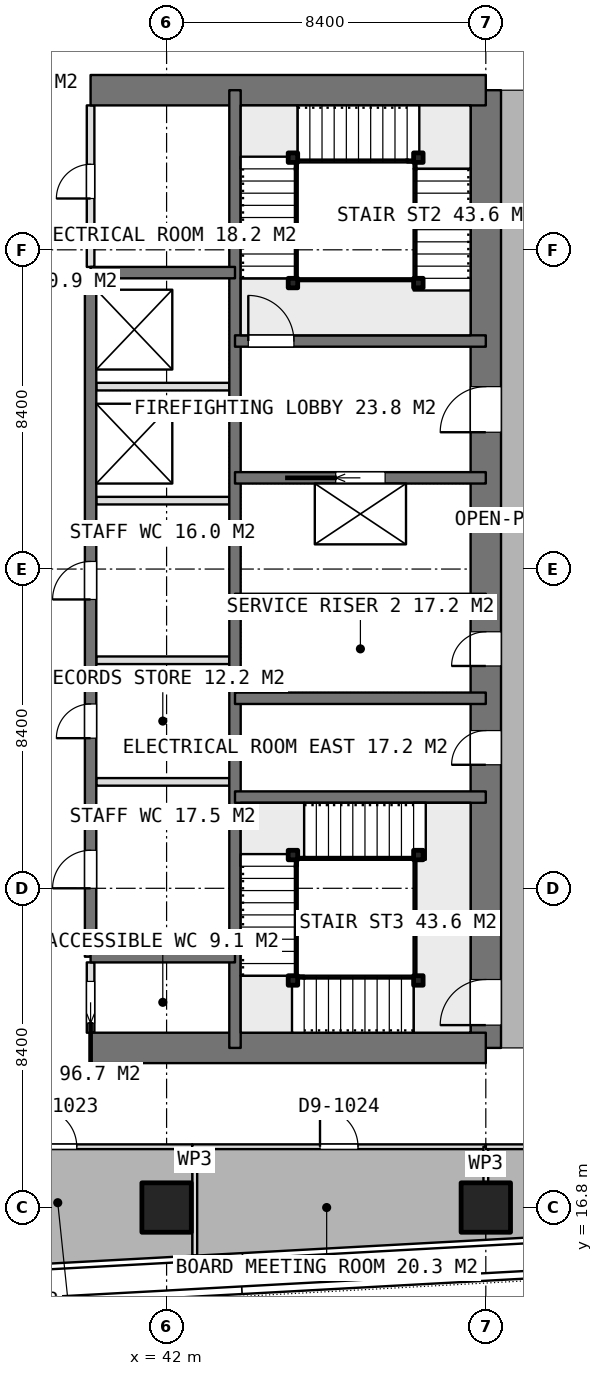
"""IFC4 building model, lengths in metres.
Left out: names, types, materials, properties, quantities, classifications, styles, units other than length and angle.
Written with IfcOpenShell. Run it as: python <this file> out.ifc"""

import sys

from ifc_helpers import new_model, si_unit, direction, frame, frame_2d, origin, origin_2d, place, context, subcontext, project, spatial, rectangle, extrude, element, fill, save


model = new_model("IFC4")
c1 = context("Model", 3, precision=1e-05, world=origin(), true_north=direction((0.0, 1.0)))
c2 = subcontext(c1, "Body", "Model", "MODEL_VIEW")
j1 = project(units=[si_unit("LENGTHUNIT", "METRE"), si_unit("PLANEANGLEUNIT", "RADIAN")], contexts=[c1])
p1 = place(None, origin())
s1 = spatial("IfcSite", under=j1, at=p1, CompositionType="ELEMENT")
p2 = place(p1, origin())
s2 = spatial("IfcBuilding", under=s1, at=p2, CompositionType="ELEMENT")
p3 = place(p2, frame((0.0, 0.0, 276.35)))
s3 = spatial("IfcBuildingStorey", under=s2, at=p3, CompositionType="ELEMENT", Elevation=276.35)
for number, where, z_axis, x_axis in (
    (1, (40.0, 21.0, 0.0), (0.0, 0.0, 1.0), (1.0, 0.0, 0.0)),
    (2, (40.0, 46.2, 0.0), (0.0, 0.0, 1.0), (1.0, 0.0, 0.0)),
):
    element("IfcWall", number, at=place(p3, frame(where, z_axis=z_axis, x_axis=x_axis)), inside=s3, PredefinedType="SHEAR", context=c2, shape_type="SweptSolid", body=[
        extrude(rectangle(XDim=10.4, YDim=0.8, at=frame_2d((5.2, 0.0))), origin(), (0.0, 0.0, 1.0), 3.75),
    ])
p4 = place(p3, frame((50.4, 21.0, 0.0), z_axis=(0.0, 0.0, 1.0), x_axis=(0.0, 1.0, 0.0)))
e3 = element("IfcWall", 3, at=p4, inside=s3, PredefinedType="SHEAR", context=c2, shape_type="SweptSolid", body=[
    extrude(rectangle(XDim=25.2, YDim=0.8, at=frame_2d((12.6, 0.0))), origin(), (0.0, 0.0, 1.0), 3.75),
])
p5 = place(p4, frame((16.2, 0.0, 0.0)))
e4 = element("IfcOpeningElement", 4, at=p5, cuts=e3, PredefinedType="OPENING", context=c2, shape_type="SweptSolid", body=[
    extrude(rectangle(XDim=1.2, YDim=2.1, at=frame_2d((0.6, 1.05))), frame((0.0, 0.41, 0.0), z_axis=(0.0, -1.0, 0.0), x_axis=(1.0, 0.0, 0.0)), (0.0, 0.0, 1.0), 0.82),
])
p6 = place(p4, frame((10.05, 0.0, 0.0)))
e5 = element("IfcOpeningElement", 5, at=p6, cuts=e3, PredefinedType="OPENING", context=c2, shape_type="SweptSolid", body=[
    extrude(rectangle(XDim=0.9, YDim=2.1, at=frame_2d((0.45, 1.05))), frame((0.0, 0.41, 0.0), z_axis=(0.0, -1.0, 0.0), x_axis=(1.0, 0.0, 0.0)), (0.0, 0.0, 1.0), 0.82),
])
p7 = place(p4, frame((7.45, 0.0, 0.0)))
e6 = element("IfcOpeningElement", 6, at=p7, cuts=e3, PredefinedType="OPENING", context=c2, shape_type="SweptSolid", body=[
    extrude(rectangle(XDim=0.9, YDim=2.1, at=frame_2d((0.45, 1.05))), frame((0.0, 0.41, 0.0), z_axis=(0.0, -1.0, 0.0), x_axis=(1.0, 0.0, 0.0)), (0.0, 0.0, 1.0), 0.82),
])
p8 = place(p4, frame((0.6, 0.0, 0.0)))
e7 = element("IfcOpeningElement", 7, at=p8, cuts=e3, PredefinedType="OPENING", context=c2, shape_type="SweptSolid", body=[
    extrude(rectangle(XDim=1.2, YDim=2.1, at=frame_2d((0.6, 1.05))), frame((0.0, 0.41, 0.0), z_axis=(0.0, -1.0, 0.0), x_axis=(1.0, 0.0, 0.0)), (0.0, 0.0, 1.0), 0.82),
])
p9 = place(p3, frame((43.8, 21.0, 0.0), z_axis=(0.0, 0.0, 1.0), x_axis=(0.0, 1.0, 0.0)))
e8 = element("IfcWall", 8, at=p9, inside=s3, PredefinedType="SHEAR", context=c2, shape_type="SweptSolid", body=[
    extrude(rectangle(XDim=25.2, YDim=0.3, at=frame_2d((12.6, 0.0))), origin(), (0.0, 0.0, 1.0), 3.75),
])
p10 = place(p3, frame((40.0, 23.4, 0.0), z_axis=(0.0, 0.0, 1.0), x_axis=(0.0, 1.0, 0.0)))
e9 = element("IfcWall", 9, at=p10, inside=s3, PredefinedType="SHEAR", context=c2, shape_type="SweptSolid", body=[
    extrude(rectangle(XDim=18.0, YDim=0.3, at=frame_2d((9.0, 0.0))), origin(), (0.0, 0.0, 1.0), 3.75),
])
p11 = place(p10, frame((1.8, 0.0, 0.0)))
e10 = element("IfcOpeningElement", 10, at=p11, cuts=e9, PredefinedType="OPENING", context=c2, shape_type="SweptSolid", body=[
    extrude(rectangle(XDim=1.0, YDim=2.1, at=frame_2d((0.5, 1.05))), frame((0.0, 0.16, 0.0), z_axis=(0.0, -1.0, 0.0), x_axis=(1.0, 0.0, 0.0)), (0.0, 0.0, 1.0), 0.32),
])
p12 = place(p10, frame((5.75, 0.0, 0.0)))
e11 = element("IfcOpeningElement", 11, at=p12, cuts=e9, PredefinedType="OPENING", context=c2, shape_type="SweptSolid", body=[
    extrude(rectangle(XDim=0.9, YDim=2.1, at=frame_2d((0.45, 1.05))), frame((0.0, 0.16, 0.0), z_axis=(0.0, -1.0, 0.0), x_axis=(1.0, 0.0, 0.0)), (0.0, 0.0, 1.0), 0.32),
])
p13 = place(p10, frame((9.4, 0.0, 0.0)))
e12 = element("IfcOpeningElement", 12, at=p13, cuts=e9, PredefinedType="OPENING", context=c2, shape_type="SweptSolid", body=[
    extrude(rectangle(XDim=1.0, YDim=2.1, at=frame_2d((0.5, 1.05))), frame((0.0, 0.16, 0.0), z_axis=(0.0, -1.0, 0.0), x_axis=(1.0, 0.0, 0.0)), (0.0, 0.0, 1.0), 0.32),
])
for number, where, z_axis, x_axis in (
    (13, (40.0, 23.4, 0.0), (0.0, 0.0, 1.0), (1.0, 0.0, 0.0)),
    (14, (40.0, 41.4, 0.0), (0.0, 0.0, 1.0), (1.0, 0.0, 0.0)),
):
    element("IfcWall", number, at=place(p3, frame(where, z_axis=z_axis, x_axis=x_axis)), inside=s3, PredefinedType="SHEAR", context=c2, shape_type="SweptSolid", body=[
        extrude(rectangle(XDim=3.8, YDim=0.3, at=frame_2d((1.9, 0.0))), origin(), (0.0, 0.0, 1.0), 3.75),
    ])
for number, where, z_axis, x_axis in (
    (15, (43.8, 27.6, 0.0), (0.0, 0.0, 1.0), (1.0, 0.0, 0.0)),
    (16, (43.8, 30.2, 0.0), (0.0, 0.0, 1.0), (1.0, 0.0, 0.0)),
    (17, (43.8, 32.8, 0.0), (0.0, 0.0, 1.0), (1.0, 0.0, 0.0)),
):
    element("IfcWall", number, at=place(p3, frame(where, z_axis=z_axis, x_axis=x_axis)), inside=s3, PredefinedType="SHEAR", context=c2, shape_type="SweptSolid", body=[
        extrude(rectangle(XDim=6.6, YDim=0.3, at=frame_2d((3.3, 0.0))), origin(), (0.0, 0.0, 1.0), 3.75),
    ])
p14 = place(p3, frame((43.8, 36.0, 0.0), z_axis=(0.0, 0.0, 1.0), x_axis=(1.0, 0.0, 0.0)))
e18 = element("IfcWall", 18, at=p14, inside=s3, PredefinedType="SHEAR", context=c2, shape_type="SweptSolid", body=[
    extrude(rectangle(XDim=6.6, YDim=0.3, at=frame_2d((3.3, 0.0))), origin(), (0.0, 0.0, 1.0), 3.75),
])
p15 = place(p14, frame((2.65, 0.0, 0.0)))
e19 = element("IfcOpeningElement", 19, at=p15, cuts=e18, PredefinedType="OPENING", context=c2, shape_type="SweptSolid", body=[
    extrude(rectangle(XDim=1.3, YDim=2.1, at=frame_2d((0.65, 1.05))), frame((0.0, 0.16, 0.0), z_axis=(0.0, -1.0, 0.0), x_axis=(1.0, 0.0, 0.0)), (0.0, 0.0, 1.0), 0.32),
])
p16 = place(p3, frame((43.8, 39.6, 0.0), z_axis=(0.0, 0.0, 1.0), x_axis=(1.0, 0.0, 0.0)))
e20 = element("IfcWall", 20, at=p16, inside=s3, PredefinedType="SHEAR", context=c2, shape_type="SweptSolid", body=[
    extrude(rectangle(XDim=6.6, YDim=0.3, at=frame_2d((3.3, 0.0))), origin(), (0.0, 0.0, 1.0), 3.75),
])
p17 = place(p16, frame((0.35, 0.0, 0.0)))
e21 = element("IfcOpeningElement", 21, at=p17, cuts=e20, PredefinedType="OPENING", context=c2, shape_type="SweptSolid", body=[
    extrude(rectangle(XDim=1.2, YDim=2.1, at=frame_2d((0.6, 1.05))), frame((0.0, 0.16, 0.0), z_axis=(0.0, -1.0, 0.0), x_axis=(1.0, 0.0, 0.0)), (0.0, 0.0, 1.0), 0.32),
])
for number, where, z_axis, x_axis in (
    (22, (42.0, 16.8, 0.0), (0.0, 0.0, 1.0), (1.0, 0.0, 0.0)),
    (23, (50.4, 16.8, 0.0), (0.0, 0.0, 1.0), (1.0, 0.0, 0.0)),
):
    element("IfcColumn", number, at=place(p3, frame(where, z_axis=z_axis, x_axis=x_axis)), inside=s3, PredefinedType="COLUMN", context=c2, shape_type="SweptSolid", body=[
        extrude(rectangle(XDim=1.3, YDim=1.3, at=origin_2d()), origin(), (0.0, 0.0, 1.0), 3.75),
    ])
for number, where, z_axis, x_axis in (
    (24, (40.15, 35.4, 0.0), (0.0, 0.0, 1.0), (1.0, 0.0, 0.0)),
    (25, (40.15, 38.4, 0.0), (0.0, 0.0, 1.0), (1.0, 0.0, 0.0)),
):
    element("IfcWall", number, at=place(p3, frame(where, z_axis=z_axis, x_axis=x_axis)), inside=s3, PredefinedType="PARTITIONING", context=c2, shape_type="SweptSolid", body=[
        extrude(rectangle(XDim=3.5, YDim=0.2, at=frame_2d((1.75, 0.0))), origin(), (0.0, 0.0, 1.0), 3.5),
    ])
p18 = place(p3, frame((40.0, 21.4, 0.0), z_axis=(0.0, 0.0, 1.0), x_axis=(0.0, 1.0, 0.0)))
e26 = element("IfcWall", 26, at=p18, inside=s3, PredefinedType="PARTITIONING", context=c2, shape_type="SweptSolid", body=[
    extrude(rectangle(XDim=1.85, YDim=0.2, at=frame_2d((0.925, 0.0))), origin(), (0.0, 0.0, 1.0), 3.5),
])
p19 = place(p18, frame((0.25, 0.0, 0.0)))
e27 = element("IfcOpeningElement", 27, at=p19, cuts=e26, PredefinedType="OPENING", context=c2, shape_type="SweptSolid", body=[
    extrude(rectangle(XDim=1.1, YDim=2.1, at=frame_2d((0.55, 1.05))), frame((0.0, 0.11, 0.0), z_axis=(0.0, -1.0, 0.0), x_axis=(1.0, 0.0, 0.0)), (0.0, 0.0, 1.0), 0.22),
])
p20 = place(p3, frame((40.0, 41.55, 0.0), z_axis=(0.0, 0.0, 1.0), x_axis=(0.0, 1.0, 0.0)))
e28 = element("IfcWall", 28, at=p20, inside=s3, PredefinedType="PARTITIONING", context=c2, shape_type="SweptSolid", body=[
    extrude(rectangle(XDim=4.25, YDim=0.2, at=frame_2d((2.125, 0.0))), origin(), (0.0, 0.0, 1.0), 3.5),
])
p21 = place(p20, frame((1.8, 0.0, 0.0)))
e29 = element("IfcOpeningElement", 29, at=p21, cuts=e28, PredefinedType="OPENING", context=c2, shape_type="SweptSolid", body=[
    extrude(rectangle(XDim=0.9, YDim=2.1, at=frame_2d((0.45, 1.05))), frame((0.0, 0.11, 0.0), z_axis=(0.0, -1.0, 0.0), x_axis=(1.0, 0.0, 0.0)), (0.0, 0.0, 1.0), 0.22),
])
for number, where, z_axis, x_axis in (
    (30, (40.15, 28.0, 0.0), (0.0, 0.0, 1.0), (1.0, 0.0, 0.0)),
    (31, (40.15, 31.2, 0.0), (0.0, 0.0, 1.0), (1.0, 0.0, 0.0)),
):
    element("IfcWall", number, at=place(p3, frame(where, z_axis=z_axis, x_axis=x_axis)), inside=s3, PredefinedType="PARTITIONING", context=c2, shape_type="SweptSolid", body=[
        extrude(rectangle(XDim=3.5, YDim=0.2, at=frame_2d((1.75, 0.0))), origin(), (0.0, 0.0, 1.0), 3.5),
    ])
p22 = place(p3, frame((35.599, 18.4, 0.0), z_axis=(0.0, 0.0, 1.0), x_axis=(1.0, 0.0, 0.0)))
e32 = element("IfcWall", 32, at=p22, inside=s3, PredefinedType="PARTITIONING", context=c2, shape_type="SweptSolid", body=[
    extrude(rectangle(XDim=7.074, YDim=0.125, at=frame_2d((3.537, 0.0))), origin(), (0.0, 0.0, 1.0), 3.5),
])
p23 = place(p22, frame((3.037, 0.0, 0.0)))
e33 = element("IfcOpeningElement", 33, at=p23, cuts=e32, PredefinedType="OPENING", context=c2, shape_type="SweptSolid", body=[
    extrude(rectangle(XDim=1.0, YDim=2.1, at=frame_2d((0.5, 1.05))), frame((0.0, 0.073, 0.0), z_axis=(0.0, -1.0, 0.0), x_axis=(1.0, 0.0, 0.0)), (0.0, 0.0, 1.0), 0.145),
])
p24 = place(p3, frame((42.742, 18.337, 0.0), z_axis=(0.0, 0.0, 1.0), x_axis=(0.0, -1.0, 0.0)))
e34 = element("IfcWall", 34, at=p24, inside=s3, PredefinedType="PARTITIONING", context=c2, shape_type="SweptSolid", body=[
    extrude(rectangle(XDim=2.799, YDim=0.125, at=frame_2d((1.399, 0.0))), origin(), (0.0, 0.0, 1.0), 3.5),
])
p25 = place(p3, frame((42.674, 18.4, 0.0), z_axis=(0.0, 0.0, 1.0), x_axis=(1.0, 0.0, 0.0)))
e35 = element("IfcWall", 35, at=p25, inside=s3, PredefinedType="PARTITIONING", context=c2, shape_type="SweptSolid", body=[
    extrude(rectangle(XDim=7.726, YDim=0.125, at=frame_2d((3.863, 0.0))), origin(), (0.0, 0.0, 1.0), 3.5),
])
p26 = place(p25, frame((3.363, 0.0, 0.0)))
e36 = element("IfcOpeningElement", 36, at=p26, cuts=e35, PredefinedType="OPENING", context=c2, shape_type="SweptSolid", body=[
    extrude(rectangle(XDim=1.0, YDim=2.1, at=frame_2d((0.5, 1.05))), frame((0.0, 0.073, 0.0), z_axis=(0.0, -1.0, 0.0), x_axis=(1.0, 0.0, 0.0)), (0.0, 0.0, 1.0), 0.145),
])
p27 = place(p3, frame((50.4, 18.4, 0.0), z_axis=(0.0, 0.0, 1.0), x_axis=(0.0, -1.0, 0.0)))
e37 = element("IfcWall", 37, at=p27, inside=s3, PredefinedType="PARTITIONING", context=c2, shape_type="SweptSolid", body=[
    extrude(rectangle(XDim=0.93, YDim=0.125, at=frame_2d((0.465, 0.0))), origin(), (0.0, 0.0, 1.0), 3.5),
])
p28 = place(p3, frame((50.401, 18.4, 0.0), z_axis=(0.0, 0.0, 1.0), x_axis=(1.0, 0.0, 0.0)))
e38 = element("IfcWall", 38, at=p28, inside=s3, PredefinedType="PARTITIONING", context=c2, shape_type="SweptSolid", body=[
    extrude(rectangle(XDim=5.999, YDim=0.125, at=frame_2d((3.0, 0.0))), origin(), (0.0, 0.0, 1.0), 3.5),
])
p29 = place(p28, frame((2.499, 0.0, 0.0)))
e39 = element("IfcOpeningElement", 39, at=p29, cuts=e38, PredefinedType="OPENING", context=c2, shape_type="SweptSolid", body=[
    extrude(rectangle(XDim=1.0, YDim=2.1, at=frame_2d((0.5, 1.05))), frame((0.0, 0.073, 0.0), z_axis=(0.0, -1.0, 0.0), x_axis=(1.0, 0.0, 0.0)), (0.0, 0.0, 1.0), 0.145),
])
for number, where, z_axis, x_axis in (
    (40, (45.325, 41.125, 0.0), (0.0, 0.0, 1.0), (1.0, 0.0, 0.0)),
    (41, (45.325, 44.425, 0.0), (0.0, 0.0, 1.0), (1.0, 0.0, 0.0)),
    (42, (48.625, 44.425, 0.0), (0.0, 0.0, 1.0), (1.0, 0.0, 0.0)),
    (43, (48.625, 41.125, 0.0), (0.0, 0.0, 1.0), (1.0, 0.0, 0.0)),
    (44, (48.625, 22.775, 0.0), (0.0, 0.0, 1.0), (1.0, 0.0, 0.0)),
    (45, (45.325, 22.775, 0.0), (0.0, 0.0, 1.0), (1.0, 0.0, 0.0)),
    (46, (45.325, 26.075, 0.0), (0.0, 0.0, 1.0), (1.0, 0.0, 0.0)),
    (47, (48.625, 26.075, 0.0), (0.0, 0.0, 1.0), (1.0, 0.0, 0.0)),
):
    element("IfcColumn", number, at=place(p3, frame(where, z_axis=z_axis, x_axis=x_axis)), inside=s3, PredefinedType="COLUMN", context=c2, shape_type="SweptSolid", body=[
        extrude(rectangle(XDim=0.25, YDim=0.25, at=origin_2d()), origin(), (0.0, 0.0, 1.0), 3.75),
    ])
p30 = place(p5, origin())
e48 = element("IfcDoor", 48, at=p30, inside=s3, OperationType="SINGLE_SWING_LEFT", PredefinedType="DOOR", context=c2, shape_type="SweptSolid", body=[
    extrude(rectangle(XDim=1.2, YDim=2.1, at=frame_2d((0.6, 1.05))), frame((0.0, 0.025, 0.0), z_axis=(0.0, -1.0, 0.0), x_axis=(1.0, 0.0, 0.0)), (0.0, 0.0, 1.0), 0.05),
])
fill(e4, e48)
p31 = place(p6, origin())
e49 = element("IfcDoor", 49, at=p31, inside=s3, OperationType="SINGLE_SWING_LEFT", PredefinedType="DOOR", context=c2, shape_type="SweptSolid", body=[
    extrude(rectangle(XDim=0.9, YDim=2.1, at=frame_2d((0.45, 1.05))), frame((0.0, 0.025, 0.0), z_axis=(0.0, -1.0, 0.0), x_axis=(1.0, 0.0, 0.0)), (0.0, 0.0, 1.0), 0.05),
])
fill(e5, e49)
p32 = place(p7, origin())
e50 = element("IfcDoor", 50, at=p32, inside=s3, OperationType="SINGLE_SWING_LEFT", PredefinedType="DOOR", context=c2, shape_type="SweptSolid", body=[
    extrude(rectangle(XDim=0.9, YDim=2.1, at=frame_2d((0.45, 1.05))), frame((0.0, 0.025, 0.0), z_axis=(0.0, -1.0, 0.0), x_axis=(1.0, 0.0, 0.0)), (0.0, 0.0, 1.0), 0.05),
])
fill(e6, e50)
p33 = place(p19, origin())
e51 = element("IfcDoor", 51, at=p33, inside=s3, OperationType="SLIDING_TO_LEFT", PredefinedType="DOOR", context=c2, shape_type="SweptSolid", body=[
    extrude(rectangle(XDim=1.1, YDim=2.1, at=frame_2d((0.55, 1.05))), frame((0.0, 0.025, 0.0), z_axis=(0.0, -1.0, 0.0), x_axis=(1.0, 0.0, 0.0)), (0.0, 0.0, 1.0), 0.05),
])
fill(e27, e51)
p34 = place(p21, origin())
e52 = element("IfcDoor", 52, at=p34, inside=s3, OperationType="SINGLE_SWING_LEFT", PredefinedType="DOOR", context=c2, shape_type="SweptSolid", body=[
    extrude(rectangle(XDim=0.9, YDim=2.1, at=frame_2d((0.45, 1.05))), frame((0.0, 0.025, 0.0), z_axis=(0.0, -1.0, 0.0), x_axis=(1.0, 0.0, 0.0)), (0.0, 0.0, 1.0), 0.05),
])
fill(e29, e52)
p35 = place(p11, origin())
e53 = element("IfcDoor", 53, at=p35, inside=s3, OperationType="SINGLE_SWING_LEFT", PredefinedType="DOOR", context=c2, shape_type="SweptSolid", body=[
    extrude(rectangle(XDim=1.0, YDim=2.1, at=frame_2d((0.5, 1.05))), frame((0.0, 0.025, 0.0), z_axis=(0.0, -1.0, 0.0), x_axis=(1.0, 0.0, 0.0)), (0.0, 0.0, 1.0), 0.05),
])
fill(e10, e53)
p36 = place(p12, origin())
e54 = element("IfcDoor", 54, at=p36, inside=s3, OperationType="SINGLE_SWING_LEFT", PredefinedType="DOOR", context=c2, shape_type="SweptSolid", body=[
    extrude(rectangle(XDim=0.9, YDim=2.1, at=frame_2d((0.45, 1.05))), frame((0.0, 0.025, 0.0), z_axis=(0.0, -1.0, 0.0), x_axis=(1.0, 0.0, 0.0)), (0.0, 0.0, 1.0), 0.05),
])
fill(e11, e54)
p37 = place(p13, origin())
e55 = element("IfcDoor", 55, at=p37, inside=s3, OperationType="SINGLE_SWING_LEFT", PredefinedType="DOOR", context=c2, shape_type="SweptSolid", body=[
    extrude(rectangle(XDim=1.0, YDim=2.1, at=frame_2d((0.5, 1.05))), frame((0.0, 0.025, 0.0), z_axis=(0.0, -1.0, 0.0), x_axis=(1.0, 0.0, 0.0)), (0.0, 0.0, 1.0), 0.05),
])
fill(e12, e55)
p38 = place(p15, origin())
e56 = element("IfcDoor", 56, at=p38, inside=s3, OperationType="SLIDING_TO_LEFT", PredefinedType="USERDEFINED", context=c2, shape_type="SweptSolid", body=[
    extrude(rectangle(XDim=1.3, YDim=2.1, at=frame_2d((0.65, 1.05))), frame((0.0, 0.025, 0.0), z_axis=(0.0, -1.0, 0.0), x_axis=(1.0, 0.0, 0.0)), (0.0, 0.0, 1.0), 0.05),
])
fill(e19, e56)
p39 = place(p23, origin())
e57 = element("IfcDoor", 57, at=p39, inside=s3, OperationType="SINGLE_SWING_LEFT", PredefinedType="DOOR", context=c2, shape_type="SweptSolid", body=[
    extrude(rectangle(XDim=1.0, YDim=2.1, at=frame_2d((0.5, 1.05))), frame((0.0, 0.025, 0.0), z_axis=(0.0, -1.0, 0.0), x_axis=(1.0, 0.0, 0.0)), (0.0, 0.0, 1.0), 0.05),
])
fill(e33, e57)
p40 = place(p26, origin())
e58 = element("IfcDoor", 58, at=p40, inside=s3, OperationType="SINGLE_SWING_LEFT", PredefinedType="DOOR", context=c2, shape_type="SweptSolid", body=[
    extrude(rectangle(XDim=1.0, YDim=2.1, at=frame_2d((0.5, 1.05))), frame((0.0, 0.025, 0.0), z_axis=(0.0, -1.0, 0.0), x_axis=(1.0, 0.0, 0.0)), (0.0, 0.0, 1.0), 0.05),
])
fill(e36, e58)
p41 = place(p17, origin())
e59 = element("IfcDoor", 59, at=p41, inside=s3, OperationType="SINGLE_SWING_RIGHT", PredefinedType="DOOR", context=c2, shape_type="SweptSolid", body=[
    extrude(rectangle(XDim=1.2, YDim=2.1, at=frame_2d((0.6, 1.05))), frame((0.0, 0.025, 0.0), z_axis=(0.0, -1.0, 0.0), x_axis=(1.0, 0.0, 0.0)), (0.0, 0.0, 1.0), 0.05),
])
fill(e21, e59)
p42 = place(p8, origin())
e60 = element("IfcDoor", 60, at=p42, inside=s3, OperationType="SINGLE_SWING_RIGHT", PredefinedType="DOOR", context=c2, shape_type="SweptSolid", body=[
    extrude(rectangle(XDim=1.2, YDim=2.1, at=frame_2d((0.6, 1.05))), frame((0.0, 0.025, 0.0), z_axis=(0.0, -1.0, 0.0), x_axis=(1.0, 0.0, 0.0)), (0.0, 0.0, 1.0), 0.05),
])
fill(e7, e60)
save(model, sys.argv[1])
